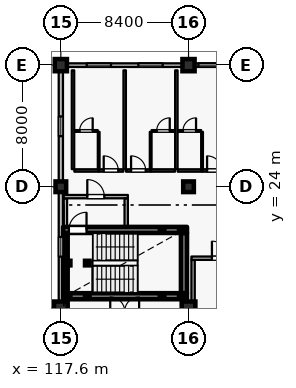
"""IFC4 building model, lengths in metres.
Left out: names, types, materials, properties, quantities, classifications, styles, units other than length and angle.
Written with IfcOpenShell. Run it as: python <this file> out.ifc"""

import sys

from ifc_helpers import new_model, si_unit, direction, frame, frame_2d, origin, origin_2d, place, context, subcontext, project, spatial, rectangle, hollow_rectangle, extrude, element, fill, save


model = new_model("IFC4")
c1 = context("Model", 3, precision=1e-05, world=origin(), true_north=direction((0.0, 1.0)))
c2 = subcontext(c1, "Body", "Model", "MODEL_VIEW")
j1 = project(units=[si_unit("LENGTHUNIT", "METRE"), si_unit("PLANEANGLEUNIT", "RADIAN")], contexts=[c1])
p1 = place(None, origin())
s1 = spatial("IfcSite", under=j1, at=p1, CompositionType="ELEMENT")
p2 = place(p1, origin())
s2 = spatial("IfcBuilding", under=s1, at=p2, CompositionType="ELEMENT")
p3 = place(p2, frame((0.0, 0.0, 25.2)))
s3 = spatial("IfcBuildingStorey", under=s2, at=p3, CompositionType="ELEMENT", Elevation=25.2)
p4 = place(p3, frame((117.6, 16.0, 0.0), z_axis=(0.0, 0.0, 1.0), x_axis=(1.0, 0.0, 0.0)))
e1 = element("IfcColumn", 1, at=p4, inside=s3, PredefinedType="COLUMN", context=c2, shape_type="SweptSolid", body=[
    extrude(rectangle(XDim=0.9, YDim=0.9, at=origin_2d()), origin(), (0.0, 0.0, 1.0), 3.6),
])
p5 = place(p3, frame((117.6, 32.0, 0.0), z_axis=(0.0, 0.0, 1.0), x_axis=(1.0, 0.0, 0.0)))
e2 = element("IfcColumn", 2, at=p5, inside=s3, PredefinedType="COLUMN", context=c2, shape_type="SweptSolid", body=[
    extrude(rectangle(XDim=0.8, YDim=0.8, at=origin_2d()), origin(), (0.0, 0.0, 1.0), 3.6),
])
p6 = place(p3, frame((126.0, 16.0, 0.0), z_axis=(0.0, 0.0, 1.0), x_axis=(1.0, 0.0, 0.0)))
e3 = element("IfcColumn", 3, at=p6, inside=s3, PredefinedType="COLUMN", context=c2, shape_type="SweptSolid", body=[
    extrude(rectangle(XDim=0.9, YDim=0.9, at=origin_2d()), origin(), (0.0, 0.0, 1.0), 3.6),
])
p7 = place(p3, frame((126.0, 32.0, 0.0), z_axis=(0.0, 0.0, 1.0), x_axis=(1.0, 0.0, 0.0)))
e4 = element("IfcColumn", 4, at=p7, inside=s3, PredefinedType="COLUMN", context=c2, shape_type="SweptSolid", body=[
    extrude(rectangle(XDim=0.8, YDim=0.8, at=origin_2d()), origin(), (0.0, 0.0, 1.0), 3.6),
])
for number, where, z_axis, x_axis in (
    (5, (117.6, 24.0, 0.0), (0.0, 0.0, 1.0), (1.0, 0.0, 0.0)),
    (6, (126.0, 24.0, 0.0), (0.0, 0.0, 1.0), (1.0, 0.0, 0.0)),
):
    element("IfcColumn", number, at=place(p3, frame(where, z_axis=z_axis, x_axis=x_axis)), inside=s3, PredefinedType="COLUMN", context=c2, shape_type="SweptSolid", body=[
        extrude(rectangle(XDim=0.7, YDim=0.7, at=origin_2d()), origin(), (0.0, 0.0, 1.0), 3.6),
    ])
p8 = place(p3, frame((118.0, 32.0, 0.0), z_axis=(0.0, 0.0, 1.0), x_axis=(1.0, 0.0, 0.0)))
e7 = element("IfcWall", 7, at=p8, inside=s3, PredefinedType="SOLIDWALL", context=c2, shape_type="SweptSolid", body=[
    extrude(rectangle(XDim=7.6, YDim=0.24, at=frame_2d((3.8, 0.0))), origin(), (0.0, 0.0, 1.0), 2.93),
])
p9 = place(p8, frame((1.3, 0.0, 0.8)))
e8 = element("IfcOpeningElement", 8, at=p9, cuts=e7, PredefinedType="OPENING", context=c2, shape_type="SweptSolid", body=[
    extrude(rectangle(XDim=1.6, YDim=1.6, at=frame_2d((0.8, 0.8))), frame((0.0, 0.13, 0.0), z_axis=(0.0, -1.0, 0.0), x_axis=(1.0, 0.0, 0.0)), (0.0, 0.0, 1.0), 0.26),
])
p10 = place(p8, frame((4.7, 0.0, 0.8)))
e9 = element("IfcOpeningElement", 9, at=p10, cuts=e7, PredefinedType="OPENING", context=c2, shape_type="SweptSolid", body=[
    extrude(rectangle(XDim=1.6, YDim=1.6, at=frame_2d((0.8, 0.8))), frame((0.0, 0.13, 0.0), z_axis=(0.0, -1.0, 0.0), x_axis=(1.0, 0.0, 0.0)), (0.0, 0.0, 1.0), 0.26),
])
p11 = place(p3, frame((126.4, 32.0, 0.0), z_axis=(0.0, 0.0, 1.0), x_axis=(1.0, 0.0, 0.0)))
e10 = element("IfcWall", 10, at=p11, inside=s3, PredefinedType="SOLIDWALL", context=c2, shape_type="SweptSolid", body=[
    extrude(rectangle(XDim=7.6, YDim=0.24, at=frame_2d((3.8, 0.0))), origin(), (0.0, 0.0, 1.0), 2.93),
])
p12 = place(p11, frame((0.25, 0.0, 0.8)))
e11 = element("IfcOpeningElement", 11, at=p12, cuts=e10, PredefinedType="OPENING", context=c2, shape_type="SweptSolid", body=[
    extrude(rectangle(XDim=1.6, YDim=1.6, at=frame_2d((0.8, 0.8))), frame((0.0, 0.13, 0.0), z_axis=(0.0, -1.0, 0.0), x_axis=(1.0, 0.0, 0.0)), (0.0, 0.0, 1.0), 0.26),
])
p13 = place(p11, frame((3.1, 0.0, 0.8)))
e12 = element("IfcOpeningElement", 12, at=p13, cuts=e10, PredefinedType="OPENING", context=c2, shape_type="SweptSolid", body=[
    extrude(rectangle(XDim=1.6, YDim=1.6, at=frame_2d((0.8, 0.8))), frame((0.0, 0.13, 0.0), z_axis=(0.0, -1.0, 0.0), x_axis=(1.0, 0.0, 0.0)), (0.0, 0.0, 1.0), 0.26),
])
p14 = place(p11, frame((5.85, 0.0, 0.8)))
e13 = element("IfcOpeningElement", 13, at=p14, cuts=e10, PredefinedType="OPENING", context=c2, shape_type="SweptSolid", body=[
    extrude(rectangle(XDim=1.6, YDim=1.6, at=frame_2d((0.8, 0.8))), frame((0.0, 0.13, 0.0), z_axis=(0.0, -1.0, 0.0), x_axis=(1.0, 0.0, 0.0)), (0.0, 0.0, 1.0), 0.26),
])
p15 = place(p3, frame((117.6, 16.45, 0.0), z_axis=(0.0, 0.0, 1.0), x_axis=(0.0, 1.0, 0.0)))
e14 = element("IfcWall", 14, at=p15, inside=s3, PredefinedType="SOLIDWALL", context=c2, shape_type="SweptSolid", body=[
    extrude(rectangle(XDim=7.2, YDim=0.28, at=frame_2d((3.6, 0.0))), origin(), (0.0, 0.0, 1.0), 2.7),
])
p16 = place(p15, frame((2.95, 0.0, 0.5)))
e15 = element("IfcOpeningElement", 15, at=p16, cuts=e14, PredefinedType="OPENING", context=c2, shape_type="SweptSolid", body=[
    extrude(rectangle(XDim=1.3, YDim=1.65, at=frame_2d((0.65, 0.825))), frame((0.0, 0.15, 0.0), z_axis=(0.0, -1.0, 0.0), x_axis=(1.0, 0.0, 0.0)), (0.0, 0.0, 1.0), 0.3),
])
p17 = place(p3, frame((117.6, 24.35, 0.0), z_axis=(0.0, 0.0, 1.0), x_axis=(0.0, 1.0, 0.0)))
e16 = element("IfcWall", 16, at=p17, inside=s3, PredefinedType="SOLIDWALL", context=c2, shape_type="SweptSolid", body=[
    extrude(rectangle(XDim=7.25, YDim=0.28, at=frame_2d((3.625, 0.0))), origin(), (0.0, 0.0, 1.0), 2.7),
])
p18 = place(p17, frame((2.975, 0.0, 0.5)))
e17 = element("IfcOpeningElement", 17, at=p18, cuts=e16, PredefinedType="OPENING", context=c2, shape_type="SweptSolid", body=[
    extrude(rectangle(XDim=1.3, YDim=1.65, at=frame_2d((0.65, 0.825))), frame((0.0, 0.15, 0.0), z_axis=(0.0, -1.0, 0.0), x_axis=(1.0, 0.0, 0.0)), (0.0, 0.0, 1.0), 0.3),
])
p19 = place(p3, frame((126.3, 13.365, 0.0), z_axis=(0.0, 0.0, 1.0), x_axis=(0.0, 1.0, 0.0)))
e18 = element("IfcWall", 18, at=p19, inside=s3, PredefinedType="PARTITIONING", context=c2, shape_type="SweptSolid", body=[
    extrude(rectangle(XDim=5.82, YDim=0.22, at=frame_2d((2.91, 0.0))), origin(), (0.0, 0.0, 1.0), 3.335),
])
p20 = place(p3, frame((126.19, 19.3, 0.0), z_axis=(0.0, 0.0, 1.0), x_axis=(1.0, 0.0, 0.0)))
e19 = element("IfcWall", 19, at=p20, inside=s3, PredefinedType="PARTITIONING", context=c2, shape_type="SweptSolid", body=[
    extrude(rectangle(XDim=3.82, YDim=0.22, at=frame_2d((1.91, 0.0))), origin(), (0.0, 0.0, 1.0), 3.335),
])
p21 = place(p20, frame((1.35, 0.0, 0.0)))
e20 = element("IfcOpeningElement", 20, at=p21, cuts=e19, PredefinedType="OPENING", context=c2, shape_type="SweptSolid", body=[
    extrude(rectangle(XDim=1.12, YDim=2.2, at=frame_2d((0.56, 1.1))), frame((0.0, 0.12, 0.0), z_axis=(0.0, -1.0, 0.0), x_axis=(1.0, 0.0, 0.0)), (0.0, 0.0, 1.0), 0.24),
])
p22 = place(p3, frame((117.75, 16.8, 0.0), z_axis=(0.0, 0.0, 1.0), x_axis=(1.0, 0.0, 0.0)))
e21 = element("IfcWall", 21, at=p22, inside=s3, PredefinedType="SHEAR", context=c2, shape_type="SweptSolid", body=[
    extrude(rectangle(XDim=8.15, YDim=0.4, at=frame_2d((4.075, 0.0))), origin(), (0.0, 0.0, 1.0), 3.335),
])
p23 = place(p3, frame((125.7, 17.005, 0.0), z_axis=(0.0, 0.0, 1.0), x_axis=(0.0, 1.0, 0.0)))
e22 = element("IfcWall", 22, at=p23, inside=s3, PredefinedType="SHEAR", context=c2, shape_type="SweptSolid", body=[
    extrude(rectangle(XDim=3.95, YDim=0.4, at=frame_2d((1.975, 0.0))), origin(), (0.0, 0.0, 1.0), 3.335),
])
p24 = place(p3, frame((117.75, 21.16, 0.0), z_axis=(0.0, 0.0, 1.0), x_axis=(1.0, 0.0, 0.0)))
e23 = element("IfcWall", 23, at=p24, inside=s3, PredefinedType="SHEAR", context=c2, shape_type="SweptSolid", body=[
    extrude(rectangle(XDim=8.15, YDim=0.4, at=frame_2d((4.075, 0.0))), origin(), (0.0, 0.0, 1.0), 3.335),
])
p25 = place(p24, frame((0.38, 0.0, 0.0)))
e24 = element("IfcOpeningElement", 24, at=p25, cuts=e23, PredefinedType="OPENING", context=c2, shape_type="SweptSolid", body=[
    extrude(rectangle(XDim=1.16, YDim=2.2, at=frame_2d((0.58, 1.1))), frame((0.0, 0.21, 0.0), z_axis=(0.0, -1.0, 0.0), x_axis=(1.0, 0.0, 0.0)), (0.0, 0.0, 1.0), 0.42),
])
p26 = place(p3, frame((117.9, 17.005, 0.0), z_axis=(0.0, 0.0, 1.0), x_axis=(0.0, 1.0, 0.0)))
e25 = element("IfcWall", 25, at=p26, inside=s3, PredefinedType="SHEAR", context=c2, shape_type="SweptSolid", body=[
    extrude(rectangle(XDim=3.95, YDim=0.3, at=frame_2d((1.975, 0.0))), origin(), (0.0, 0.0, 1.0), 3.335),
])
p27 = place(p3, frame((117.9, 21.365, 0.0), z_axis=(0.0, 0.0, 1.0), x_axis=(0.0, 1.0, 0.0)))
e26 = element("IfcWall", 26, at=p27, inside=s3, PredefinedType="PARTITIONING", context=c2, shape_type="SweptSolid", body=[
    extrude(rectangle(XDim=1.87, YDim=0.22, at=frame_2d((0.935, 0.0))), origin(), (0.0, 0.0, 1.0), 3.335),
])
p28 = place(p3, frame((117.79, 23.35, 0.0), z_axis=(0.0, 0.0, 1.0), x_axis=(1.0, 0.0, 0.0)))
e27 = element("IfcWall", 27, at=p28, inside=s3, PredefinedType="PARTITIONING", context=c2, shape_type="SweptSolid", body=[
    extrude(rectangle(XDim=4.22, YDim=0.22, at=frame_2d((2.11, 0.0))), origin(), (0.0, 0.0, 1.0), 3.335),
])
p29 = place(p28, frame((1.55, 0.0, 0.0)))
e28 = element("IfcOpeningElement", 28, at=p29, cuts=e27, PredefinedType="OPENING", context=c2, shape_type="SweptSolid", body=[
    extrude(rectangle(XDim=1.12, YDim=2.2, at=frame_2d((0.56, 1.1))), frame((0.0, 0.12, 0.0), z_axis=(0.0, -1.0, 0.0), x_axis=(1.0, 0.0, 0.0)), (0.0, 0.0, 1.0), 0.24),
])
p30 = place(p3, frame((121.9, 21.365, 0.0), z_axis=(0.0, 0.0, 1.0), x_axis=(0.0, 1.0, 0.0)))
e29 = element("IfcWall", 29, at=p30, inside=s3, PredefinedType="PARTITIONING", context=c2, shape_type="SweptSolid", body=[
    extrude(rectangle(XDim=1.87, YDim=0.22, at=frame_2d((0.935, 0.0))), origin(), (0.0, 0.0, 1.0), 3.335),
])
for number, where, z_axis, x_axis in (
    (30, (118.08, 16.8, 0.0), (0.0, 0.0, 1.0), (1.0, 0.0, 0.0)),
    (31, (118.08, 18.98, 0.0), (0.0, 0.0, 1.0), (1.0, 0.0, 0.0)),
    (32, (119.34, 16.8, 0.0), (0.0, 0.0, 1.0), (1.0, 0.0, 0.0)),
    (33, (119.34, 18.98, 0.0), (0.0, 0.0, 1.0), (1.0, 0.0, 0.0)),
):
    element("IfcColumn", number, at=place(p3, frame(where, z_axis=z_axis, x_axis=x_axis)), inside=s3, PredefinedType="COLUMN", context=c2, shape_type="SweptSolid", body=[
        extrude(hollow_rectangle(XDim=0.3, YDim=0.3, WallThickness=0.012, at=origin_2d()), origin(), (0.0, 0.0, 1.0), 3.42),
    ])
for number, where, z_axis, x_axis in (
    (34, (124.26, 16.8, -2.1), (0.0, 0.0, 1.0), (1.0, 0.0, 0.0)),
    (35, (124.26, 21.16, -2.1), (0.0, 0.0, 1.0), (1.0, 0.0, 0.0)),
    (36, (125.52, 16.8, -2.1), (0.0, 0.0, 1.0), (1.0, 0.0, 0.0)),
    (37, (125.52, 21.16, -2.1), (0.0, 0.0, 1.0), (1.0, 0.0, 0.0)),
):
    element("IfcColumn", number, at=place(p3, frame(where, z_axis=z_axis, x_axis=x_axis)), inside=s3, PredefinedType="COLUMN", context=c2, shape_type="SweptSolid", body=[
        extrude(hollow_rectangle(XDim=0.3, YDim=0.3, WallThickness=0.012, at=origin_2d()), origin(), (0.0, 0.0, 1.0), 3.72),
    ])
p31 = place(p3, frame((118.49, 25.07, 0.0), z_axis=(0.0, 0.0, 1.0), x_axis=(1.0, 0.0, 0.0)))
e38 = element("IfcWall", 38, at=p31, inside=s3, PredefinedType="PARTITIONING", context=c2, shape_type="SweptSolid", body=[
    extrude(rectangle(XDim=1.59, YDim=0.16, at=frame_2d((0.795, 0.0))), origin(), (0.0, 0.0, 1.0), 3.335),
])
p32 = place(p3, frame((120.09, 25.07, 0.0), z_axis=(0.0, 0.0, 1.0), x_axis=(1.0, 0.0, 0.0)))
e39 = element("IfcWall", 39, at=p32, inside=s3, PredefinedType="PARTITIONING", context=c2, shape_type="SweptSolid", body=[
    extrude(rectangle(XDim=1.62, YDim=0.16, at=frame_2d((0.81, 0.0))), origin(), (0.0, 0.0, 1.0), 3.335),
])
p33 = place(p32, frame((0.33, 0.0, 0.0)))
e40 = element("IfcOpeningElement", 40, at=p33, cuts=e39, PredefinedType="OPENING", context=c2, shape_type="SweptSolid", body=[
    extrude(rectangle(XDim=0.96, YDim=2.2, at=frame_2d((0.48, 1.1))), frame((0.0, 0.09, 0.0), z_axis=(0.0, -1.0, 0.0), x_axis=(1.0, 0.0, 0.0)), (0.0, 0.0, 1.0), 0.18),
])
p34 = place(p3, frame((120.09, 25.16, 0.0), z_axis=(0.0, 0.0, 1.0), x_axis=(0.0, 1.0, 0.0)))
e41 = element("IfcWall", 41, at=p34, inside=s3, PredefinedType="PARTITIONING", context=c2, shape_type="SweptSolid", body=[
    extrude(rectangle(XDim=2.45, YDim=0.115, at=frame_2d((1.225, 0.0))), origin(), (0.0, 0.0, 1.0), 3.335),
])
p35 = place(p3, frame((118.5, 27.67, 0.0), z_axis=(0.0, 0.0, 1.0), x_axis=(1.0, 0.0, 0.0)))
e42 = element("IfcWall", 42, at=p35, inside=s3, PredefinedType="PARTITIONING", context=c2, shape_type="SweptSolid", body=[
    extrude(rectangle(XDim=1.53, YDim=0.115, at=frame_2d((0.765, 0.0))), origin(), (0.0, 0.0, 1.0), 3.335),
])
p36 = place(p35, frame((0.335, 0.0, 0.0)))
e43 = element("IfcOpeningElement", 43, at=p36, cuts=e42, PredefinedType="OPENING", context=c2, shape_type="SweptSolid", body=[
    extrude(rectangle(XDim=0.86, YDim=2.12, at=frame_2d((0.43, 1.06))), frame((0.0, 0.067, 0.0), z_axis=(0.0, -1.0, 0.0), x_axis=(1.0, 0.0, 0.0)), (0.0, 0.0, 1.0), 0.135),
])
p37 = place(p3, frame((118.4, 25.16, 0.0), z_axis=(0.0, 0.0, 1.0), x_axis=(0.0, 1.0, 0.0)))
e44 = element("IfcWall", 44, at=p37, inside=s3, PredefinedType="PARTITIONING", context=c2, shape_type="SweptSolid", body=[
    extrude(rectangle(XDim=6.5, YDim=0.16, at=frame_2d((3.25, 0.0))), origin(), (0.0, 0.0, 1.0), 3.335),
])
p38 = place(p3, frame((121.89, 25.07, 0.0), z_axis=(0.0, 0.0, 1.0), x_axis=(1.0, 0.0, 0.0)))
e45 = element("IfcWall", 45, at=p38, inside=s3, PredefinedType="PARTITIONING", context=c2, shape_type="SweptSolid", body=[
    extrude(rectangle(XDim=1.62, YDim=0.16, at=frame_2d((0.81, 0.0))), origin(), (0.0, 0.0, 1.0), 3.335),
])
p39 = place(p38, frame((0.33, 0.0, 0.0)))
e46 = element("IfcOpeningElement", 46, at=p39, cuts=e45, PredefinedType="OPENING", context=c2, shape_type="SweptSolid", body=[
    extrude(rectangle(XDim=0.96, YDim=2.2, at=frame_2d((0.48, 1.1))), frame((0.0, 0.09, 0.0), z_axis=(0.0, -1.0, 0.0), x_axis=(1.0, 0.0, 0.0)), (0.0, 0.0, 1.0), 0.18),
])
p40 = place(p3, frame((123.52, 25.07, 0.0), z_axis=(0.0, 0.0, 1.0), x_axis=(1.0, 0.0, 0.0)))
e47 = element("IfcWall", 47, at=p40, inside=s3, PredefinedType="PARTITIONING", context=c2, shape_type="SweptSolid", body=[
    extrude(rectangle(XDim=1.59, YDim=0.16, at=frame_2d((0.795, 0.0))), origin(), (0.0, 0.0, 1.0), 3.335),
])
p41 = place(p3, frame((123.51, 25.16, 0.0), z_axis=(0.0, 0.0, 1.0), x_axis=(0.0, 1.0, 0.0)))
e48 = element("IfcWall", 48, at=p41, inside=s3, PredefinedType="PARTITIONING", context=c2, shape_type="SweptSolid", body=[
    extrude(rectangle(XDim=2.45, YDim=0.115, at=frame_2d((1.225, 0.0))), origin(), (0.0, 0.0, 1.0), 3.335),
])
p42 = place(p3, frame((123.57, 27.67, 0.0), z_axis=(0.0, 0.0, 1.0), x_axis=(1.0, 0.0, 0.0)))
e49 = element("IfcWall", 49, at=p42, inside=s3, PredefinedType="PARTITIONING", context=c2, shape_type="SweptSolid", body=[
    extrude(rectangle(XDim=1.53, YDim=0.115, at=frame_2d((0.765, 0.0))), origin(), (0.0, 0.0, 1.0), 3.335),
])
p43 = place(p42, frame((0.335, 0.0, 0.0)))
e50 = element("IfcOpeningElement", 50, at=p43, cuts=e49, PredefinedType="OPENING", context=c2, shape_type="SweptSolid", body=[
    extrude(rectangle(XDim=0.86, YDim=2.12, at=frame_2d((0.43, 1.06))), frame((0.0, 0.067, 0.0), z_axis=(0.0, -1.0, 0.0), x_axis=(1.0, 0.0, 0.0)), (0.0, 0.0, 1.0), 0.135),
])
p44 = place(p3, frame((121.8, 25.16, 0.0), z_axis=(0.0, 0.0, 1.0), x_axis=(0.0, 1.0, 0.0)))
e51 = element("IfcWall", 51, at=p44, inside=s3, PredefinedType="PARTITIONING", context=c2, shape_type="SweptSolid", body=[
    extrude(rectangle(XDim=6.5, YDim=0.16, at=frame_2d((3.25, 0.0))), origin(), (0.0, 0.0, 1.0), 3.335),
])
p45 = place(p3, frame((125.29, 25.07, 0.0), z_axis=(0.0, 0.0, 1.0), x_axis=(1.0, 0.0, 0.0)))
e52 = element("IfcWall", 52, at=p45, inside=s3, PredefinedType="PARTITIONING", context=c2, shape_type="SweptSolid", body=[
    extrude(rectangle(XDim=1.59, YDim=0.16, at=frame_2d((0.795, 0.0))), origin(), (0.0, 0.0, 1.0), 3.335),
])
p46 = place(p3, frame((126.89, 25.07, 0.0), z_axis=(0.0, 0.0, 1.0), x_axis=(1.0, 0.0, 0.0)))
e53 = element("IfcWall", 53, at=p46, inside=s3, PredefinedType="PARTITIONING", context=c2, shape_type="SweptSolid", body=[
    extrude(rectangle(XDim=1.62, YDim=0.16, at=frame_2d((0.81, 0.0))), origin(), (0.0, 0.0, 1.0), 3.335),
])
p47 = place(p46, frame((0.33, 0.0, 0.0)))
e54 = element("IfcOpeningElement", 54, at=p47, cuts=e53, PredefinedType="OPENING", context=c2, shape_type="SweptSolid", body=[
    extrude(rectangle(XDim=0.96, YDim=2.2, at=frame_2d((0.48, 1.1))), frame((0.0, 0.09, 0.0), z_axis=(0.0, -1.0, 0.0), x_axis=(1.0, 0.0, 0.0)), (0.0, 0.0, 1.0), 0.18),
])
p48 = place(p3, frame((126.89, 25.16, 0.0), z_axis=(0.0, 0.0, 1.0), x_axis=(0.0, 1.0, 0.0)))
e55 = element("IfcWall", 55, at=p48, inside=s3, PredefinedType="PARTITIONING", context=c2, shape_type="SweptSolid", body=[
    extrude(rectangle(XDim=2.45, YDim=0.115, at=frame_2d((1.225, 0.0))), origin(), (0.0, 0.0, 1.0), 3.335),
])
p49 = place(p3, frame((125.3, 27.67, 0.0), z_axis=(0.0, 0.0, 1.0), x_axis=(1.0, 0.0, 0.0)))
e56 = element("IfcWall", 56, at=p49, inside=s3, PredefinedType="PARTITIONING", context=c2, shape_type="SweptSolid", body=[
    extrude(rectangle(XDim=1.53, YDim=0.115, at=frame_2d((0.765, 0.0))), origin(), (0.0, 0.0, 1.0), 3.335),
])
p50 = place(p49, frame((0.335, 0.0, 0.0)))
e57 = element("IfcOpeningElement", 57, at=p50, cuts=e56, PredefinedType="OPENING", context=c2, shape_type="SweptSolid", body=[
    extrude(rectangle(XDim=0.86, YDim=2.12, at=frame_2d((0.43, 1.06))), frame((0.0, 0.067, 0.0), z_axis=(0.0, -1.0, 0.0), x_axis=(1.0, 0.0, 0.0)), (0.0, 0.0, 1.0), 0.135),
])
p51 = place(p3, frame((125.2, 25.16, 0.0), z_axis=(0.0, 0.0, 1.0), x_axis=(0.0, 1.0, 0.0)))
e58 = element("IfcWall", 58, at=p51, inside=s3, PredefinedType="PARTITIONING", context=c2, shape_type="SweptSolid", body=[
    extrude(rectangle(XDim=6.5, YDim=0.16, at=frame_2d((3.25, 0.0))), origin(), (0.0, 0.0, 1.0), 3.335),
])
p52 = place(p9, origin())
e59 = element("IfcWindow", 59, at=p52, inside=s3, PartitioningType="SINGLE_PANEL", PredefinedType="WINDOW", context=c2, shape_type="SweptSolid", body=[
    extrude(rectangle(XDim=1.6, YDim=1.6, at=frame_2d((0.8, 0.8))), frame((0.0, 0.03, 0.0), z_axis=(0.0, -1.0, 0.0), x_axis=(1.0, 0.0, 0.0)), (0.0, 0.0, 1.0), 0.06),
])
fill(e8, e59)
p53 = place(p10, origin())
e60 = element("IfcWindow", 60, at=p53, inside=s3, PartitioningType="SINGLE_PANEL", PredefinedType="WINDOW", context=c2, shape_type="SweptSolid", body=[
    extrude(rectangle(XDim=1.6, YDim=1.6, at=frame_2d((0.8, 0.8))), frame((0.0, 0.03, 0.0), z_axis=(0.0, -1.0, 0.0), x_axis=(1.0, 0.0, 0.0)), (0.0, 0.0, 1.0), 0.06),
])
fill(e9, e60)
p54 = place(p12, origin())
e61 = element("IfcWindow", 61, at=p54, inside=s3, PartitioningType="SINGLE_PANEL", PredefinedType="WINDOW", context=c2, shape_type="SweptSolid", body=[
    extrude(rectangle(XDim=1.6, YDim=1.6, at=frame_2d((0.8, 0.8))), frame((0.0, 0.03, 0.0), z_axis=(0.0, -1.0, 0.0), x_axis=(1.0, 0.0, 0.0)), (0.0, 0.0, 1.0), 0.06),
])
fill(e11, e61)
p55 = place(p16, origin())
e62 = element("IfcWindow", 62, at=p55, inside=s3, PartitioningType="SINGLE_PANEL", PredefinedType="WINDOW", context=c2, shape_type="SweptSolid", body=[
    extrude(rectangle(XDim=1.3, YDim=1.65, at=frame_2d((0.65, 0.825))), frame((0.0, 0.03, 0.0), z_axis=(0.0, -1.0, 0.0), x_axis=(1.0, 0.0, 0.0)), (0.0, 0.0, 1.0), 0.06),
])
fill(e15, e62)
p56 = place(p18, origin())
e63 = element("IfcWindow", 63, at=p56, inside=s3, PartitioningType="SINGLE_PANEL", PredefinedType="WINDOW", context=c2, shape_type="SweptSolid", body=[
    extrude(rectangle(XDim=1.3, YDim=1.65, at=frame_2d((0.65, 0.825))), frame((0.0, 0.03, 0.0), z_axis=(0.0, -1.0, 0.0), x_axis=(1.0, 0.0, 0.0)), (0.0, 0.0, 1.0), 0.06),
])
fill(e17, e63)
p57 = place(p21, origin())
e64 = element("IfcDoor", 64, at=p57, inside=s3, OperationType="SINGLE_SWING_LEFT", PredefinedType="DOOR", context=c2, shape_type="SweptSolid", body=[
    extrude(rectangle(XDim=1.12, YDim=2.2, at=frame_2d((0.56, 1.1))), frame((0.0, 0.025, 0.0), z_axis=(0.0, -1.0, 0.0), x_axis=(1.0, 0.0, 0.0)), (0.0, 0.0, 1.0), 0.05),
])
fill(e20, e64)
p58 = place(p25, origin())
e65 = element("IfcDoor", 65, at=p58, inside=s3, OperationType="SINGLE_SWING_RIGHT", PredefinedType="DOOR", context=c2, shape_type="SweptSolid", body=[
    extrude(rectangle(XDim=1.16, YDim=2.2, at=frame_2d((0.58, 1.1))), frame((0.0, 0.025, 0.0), z_axis=(0.0, -1.0, 0.0), x_axis=(1.0, 0.0, 0.0)), (0.0, 0.0, 1.0), 0.05),
])
fill(e24, e65)
p59 = place(p29, origin())
e66 = element("IfcDoor", 66, at=p59, inside=s3, OperationType="SINGLE_SWING_LEFT", PredefinedType="DOOR", context=c2, shape_type="SweptSolid", body=[
    extrude(rectangle(XDim=1.12, YDim=2.2, at=frame_2d((0.56, 1.1))), frame((0.0, 0.025, 0.0), z_axis=(0.0, -1.0, 0.0), x_axis=(1.0, 0.0, 0.0)), (0.0, 0.0, 1.0), 0.05),
])
fill(e28, e66)
p60 = place(p33, origin())
e67 = element("IfcDoor", 67, at=p60, inside=s3, OperationType="SINGLE_SWING_LEFT", PredefinedType="DOOR", context=c2, shape_type="SweptSolid", body=[
    extrude(rectangle(XDim=0.96, YDim=2.2, at=frame_2d((0.48, 1.1))), frame((0.0, 0.025, 0.0), z_axis=(0.0, -1.0, 0.0), x_axis=(1.0, 0.0, 0.0)), (0.0, 0.0, 1.0), 0.05),
])
fill(e40, e67)
p61 = place(p36, origin())
e68 = element("IfcDoor", 68, at=p61, inside=s3, OperationType="SINGLE_SWING_RIGHT", PredefinedType="DOOR", context=c2, shape_type="SweptSolid", body=[
    extrude(rectangle(XDim=0.86, YDim=2.12, at=frame_2d((0.43, 1.06))), frame((0.0, 0.025, 0.0), z_axis=(0.0, -1.0, 0.0), x_axis=(1.0, 0.0, 0.0)), (0.0, 0.0, 1.0), 0.05),
])
fill(e43, e68)
p62 = place(p39, origin())
e69 = element("IfcDoor", 69, at=p62, inside=s3, OperationType="SINGLE_SWING_LEFT", PredefinedType="DOOR", context=c2, shape_type="SweptSolid", body=[
    extrude(rectangle(XDim=0.96, YDim=2.2, at=frame_2d((0.48, 1.1))), frame((0.0, 0.025, 0.0), z_axis=(0.0, -1.0, 0.0), x_axis=(1.0, 0.0, 0.0)), (0.0, 0.0, 1.0), 0.05),
])
fill(e46, e69)
p63 = place(p43, origin())
e70 = element("IfcDoor", 70, at=p63, inside=s3, OperationType="SINGLE_SWING_RIGHT", PredefinedType="DOOR", context=c2, shape_type="SweptSolid", body=[
    extrude(rectangle(XDim=0.86, YDim=2.12, at=frame_2d((0.43, 1.06))), frame((0.0, 0.025, 0.0), z_axis=(0.0, -1.0, 0.0), x_axis=(1.0, 0.0, 0.0)), (0.0, 0.0, 1.0), 0.05),
])
fill(e50, e70)
p64 = place(p47, origin())
e71 = element("IfcDoor", 71, at=p64, inside=s3, OperationType="SINGLE_SWING_LEFT", PredefinedType="DOOR", context=c2, shape_type="SweptSolid", body=[
    extrude(rectangle(XDim=0.96, YDim=2.2, at=frame_2d((0.48, 1.1))), frame((0.0, 0.025, 0.0), z_axis=(0.0, -1.0, 0.0), x_axis=(1.0, 0.0, 0.0)), (0.0, 0.0, 1.0), 0.05),
])
fill(e54, e71)
p65 = place(p50, origin())
e72 = element("IfcDoor", 72, at=p65, inside=s3, OperationType="SINGLE_SWING_RIGHT", PredefinedType="DOOR", context=c2, shape_type="SweptSolid", body=[
    extrude(rectangle(XDim=0.86, YDim=2.12, at=frame_2d((0.43, 1.06))), frame((0.0, 0.025, 0.0), z_axis=(0.0, -1.0, 0.0), x_axis=(1.0, 0.0, 0.0)), (0.0, 0.0, 1.0), 0.05),
])
fill(e57, e72)
save(model, sys.argv[1])
